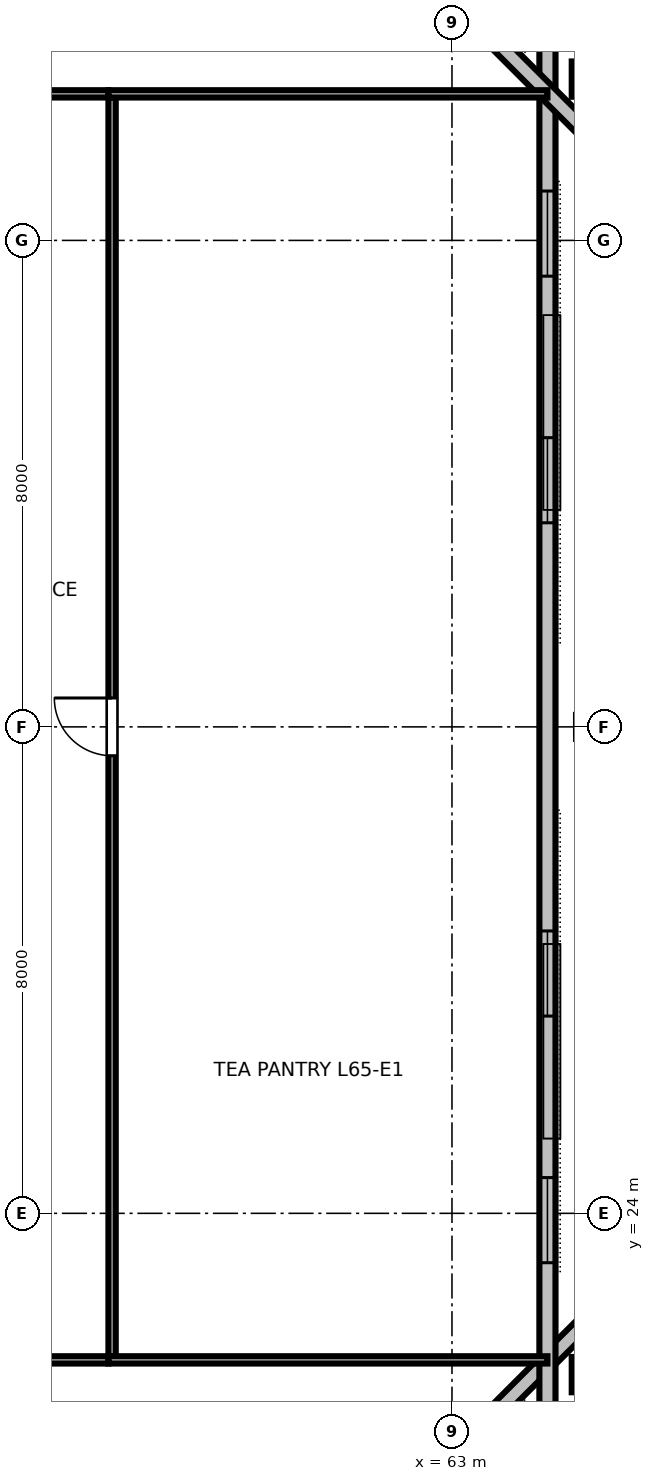
"""IFC4 building model, lengths in metres.
Left out: names, types, materials, properties, quantities, classifications, styles, units other than length and angle.
Written with IfcOpenShell. Run it as: python <this file> out.ifc"""

import sys

from ifc_helpers import new_model, si_unit, direction, frame, frame_2d, origin, origin_2d, place, context, subcontext, project, spatial, rectangle, hollow_rectangle, i_section, extrude, element, fill, save


model = new_model("IFC4")
c1 = context("Model", 3, precision=1e-05, world=origin(), true_north=direction((0.0, 1.0)))
c2 = subcontext(c1, "Body", "Model", "MODEL_VIEW")
j1 = project(units=[si_unit("LENGTHUNIT", "METRE"), si_unit("PLANEANGLEUNIT", "RADIAN")], contexts=[c1])
p1 = place(None, origin())
s1 = spatial("IfcSite", under=j1, at=p1, CompositionType="ELEMENT")
p2 = place(p1, origin())
s2 = spatial("IfcBuilding", under=s1, at=p2, CompositionType="ELEMENT")
p3 = place(p2, frame((0.0, 0.0, 246.6)))
s3 = spatial("IfcBuildingStorey", under=s2, at=p3, CompositionType="ELEMENT", Elevation=246.6)
p4 = place(p3, frame((65.32, 21.348, 0.0), z_axis=(-0.177670579794, 0.155655183327, 0.971701923935), x_axis=(0.730885754555, -0.640320734295, 0.236210438002)))
e1 = element("IfcColumn", 1, at=p4, inside=s3, PredefinedType="COLUMN", context=c2, shape_type="SweptSolid", body=[
    extrude(hollow_rectangle(XDim=0.58, YDim=0.7, WallThickness=0.032, at=origin_2d()), origin(), (0.0, 0.0, 1.0), 3.471),
])
p5 = place(p3, frame((65.23, 32.0, 0.0), z_axis=(-0.178966909192, 0.0, 0.983855093708), x_axis=(0.983855093708, 0.0, 0.178966909192)))
e2 = element("IfcColumn", 2, at=p5, inside=s3, PredefinedType="COLUMN", context=c2, shape_type="SweptSolid", body=[
    extrude(i_section(OverallWidth=0.395, OverallDepth=0.38, WebThickness=0.019, FlangeThickness=0.03, FilletRadius=0.025, at=origin_2d()), origin(), (0.0, 0.0, 1.0), 3.428),
])
p6 = place(p3, frame((65.32, 42.652, 0.0), z_axis=(-0.177670579794, -0.155655183327, 0.971701923935), x_axis=(0.730885754555, 0.640320734295, 0.236210438002)))
e3 = element("IfcColumn", 3, at=p6, inside=s3, PredefinedType="COLUMN", context=c2, shape_type="SweptSolid", body=[
    extrude(hollow_rectangle(XDim=0.58, YDim=0.7, WallThickness=0.032, at=origin_2d()), origin(), (0.0, 0.0, 1.0), 3.471),
])
p7 = place(p3, frame((57.604, 14.606, 0.0), z_axis=(0.0, 0.0, 1.0), x_axis=(0.707106781187, 0.707106781187, 0.0)))
e4 = element("IfcWall", 4, at=p7, inside=s3, PredefinedType="STANDARD", context=c2, shape_type="SweptSolid", body=[
    extrude(rectangle(XDim=10.662, YDim=0.265, at=frame_2d((5.331, 0.0))), origin(), (0.0, 0.0, 1.0), 2.832),
])
p8 = place(p3, frame((64.57, 20.76, 0.0), z_axis=(0.0, 0.0, 1.0), x_axis=(0.0, 1.0, 0.0)))
e5 = element("IfcWall", 5, at=p8, inside=s3, PredefinedType="STANDARD", context=c2, shape_type="SweptSolid", body=[
    extrude(rectangle(XDim=22.48, YDim=0.265, at=frame_2d((11.24, 0.0))), origin(), (0.0, 0.0, 1.0), 2.832),
])
p9 = place(p8, frame((2.428, 0.0, 0.85)))
e6 = element("IfcOpeningElement", 6, at=p9, cuts=e5, PredefinedType="OPENING", context=c2, shape_type="SweptSolid", body=[
    extrude(rectangle(XDim=1.4, YDim=1.2, at=frame_2d((0.7, 0.6))), frame((0.0, 0.142, 0.0), z_axis=(0.0, -1.0, 0.0), x_axis=(1.0, 0.0, 0.0)), (0.0, 0.0, 1.0), 0.285),
])
p10 = place(p8, frame((6.484, 0.0, 0.85)))
e7 = element("IfcOpeningElement", 7, at=p10, cuts=e5, PredefinedType="OPENING", context=c2, shape_type="SweptSolid", body=[
    extrude(rectangle(XDim=1.4, YDim=1.2, at=frame_2d((0.7, 0.6))), frame((0.0, 0.142, 0.0), z_axis=(0.0, -1.0, 0.0), x_axis=(1.0, 0.0, 0.0)), (0.0, 0.0, 1.0), 0.285),
])
p11 = place(p8, frame((14.596, 0.0, 0.85)))
e8 = element("IfcOpeningElement", 8, at=p11, cuts=e5, PredefinedType="OPENING", context=c2, shape_type="SweptSolid", body=[
    extrude(rectangle(XDim=1.4, YDim=1.2, at=frame_2d((0.7, 0.6))), frame((0.0, 0.142, 0.0), z_axis=(0.0, -1.0, 0.0), x_axis=(1.0, 0.0, 0.0)), (0.0, 0.0, 1.0), 0.285),
])
p12 = place(p8, frame((18.652, 0.0, 0.85)))
e9 = element("IfcOpeningElement", 9, at=p12, cuts=e5, PredefinedType="OPENING", context=c2, shape_type="SweptSolid", body=[
    extrude(rectangle(XDim=1.4, YDim=1.2, at=frame_2d((0.7, 0.6))), frame((0.0, 0.142, 0.0), z_axis=(0.0, -1.0, 0.0), x_axis=(1.0, 0.0, 0.0)), (0.0, 0.0, 1.0), 0.285),
])
p13 = place(p3, frame((65.144, 41.854, 0.0), z_axis=(0.0, 0.0, 1.0), x_axis=(-0.707106781187, 0.707106781187, 0.0)))
e10 = element("IfcWall", 10, at=p13, inside=s3, PredefinedType="STANDARD", context=c2, shape_type="SweptSolid", body=[
    extrude(rectangle(XDim=10.662, YDim=0.265, at=frame_2d((5.331, 0.0))), origin(), (0.0, 0.0, 1.0), 2.832),
])
p14 = place(p3, frame((47.02, 21.59, 0.0), z_axis=(0.0, 0.0, 1.0), x_axis=(1.0, 0.0, 0.0)))
e11 = element("IfcWall", 11, at=p14, inside=s3, PredefinedType="PARTITIONING", context=c2, shape_type="SweptSolid", body=[
    extrude(rectangle(XDim=10.33, YDim=0.12, at=frame_2d((5.165, 0.0))), origin(), (0.0, 0.0, 1.0), 2.655),
])
p15 = place(p14, frame((4.62, 0.0, 0.0)))
e12 = element("IfcOpeningElement", 12, at=p15, cuts=e11, PredefinedType="OPENING", context=c2, shape_type="SweptSolid", body=[
    extrude(rectangle(XDim=0.95, YDim=2.15, at=frame_2d((0.475, 1.075))), frame((0.0, 0.07, 0.0), z_axis=(0.0, -1.0, 0.0), x_axis=(1.0, 0.0, 0.0)), (0.0, 0.0, 1.0), 0.14),
])
p16 = place(p3, frame((47.02, 42.41, 0.0), z_axis=(0.0, 0.0, 1.0), x_axis=(1.0, 0.0, 0.0)))
e13 = element("IfcWall", 13, at=p16, inside=s3, PredefinedType="PARTITIONING", context=c2, shape_type="SweptSolid", body=[
    extrude(rectangle(XDim=10.33, YDim=0.12, at=frame_2d((5.165, 0.0))), origin(), (0.0, 0.0, 1.0), 2.655),
])
p17 = place(p16, frame((0.81, 0.0, 0.0)))
e14 = element("IfcOpeningElement", 14, at=p17, cuts=e13, PredefinedType="OPENING", context=c2, shape_type="SweptSolid", body=[
    extrude(rectangle(XDim=0.95, YDim=2.15, at=frame_2d((0.475, 1.075))), frame((0.0, 0.07, 0.0), z_axis=(0.0, -1.0, 0.0), x_axis=(1.0, 0.0, 0.0)), (0.0, 0.0, 1.0), 0.14),
])
p18 = place(p16, frame((5.905, 0.0, 0.0)))
e15 = element("IfcOpeningElement", 15, at=p18, cuts=e13, PredefinedType="OPENING", context=c2, shape_type="SweptSolid", body=[
    extrude(rectangle(XDim=0.95, YDim=2.15, at=frame_2d((0.475, 1.075))), frame((0.0, 0.07, 0.0), z_axis=(0.0, -1.0, 0.0), x_axis=(1.0, 0.0, 0.0)), (0.0, 0.0, 1.0), 0.14),
])
p19 = place(p3, frame((57.41, 21.65, 0.0), z_axis=(0.0, 0.0, 1.0), x_axis=(0.0, 1.0, 0.0)))
e16 = element("IfcWall", 16, at=p19, inside=s3, PredefinedType="PARTITIONING", context=c2, shape_type="SweptSolid", body=[
    extrude(rectangle(XDim=20.7, YDim=0.12, at=frame_2d((10.35, 0.0))), origin(), (0.0, 0.0, 1.0), 2.655),
])
p20 = place(p19, frame((9.875, 0.0, 0.0)))
e17 = element("IfcOpeningElement", 17, at=p20, cuts=e16, PredefinedType="OPENING", context=c2, shape_type="SweptSolid", body=[
    extrude(rectangle(XDim=0.95, YDim=2.15, at=frame_2d((0.475, 1.075))), frame((0.0, 0.07, 0.0), z_axis=(0.0, -1.0, 0.0), x_axis=(1.0, 0.0, 0.0)), (0.0, 0.0, 1.0), 0.14),
])
for number, where, z_axis, x_axis in (
    (18, (57.35, 21.59, 0.0), (0.0, 0.0, 1.0), (1.0, 0.0, 0.0)),
    (19, (57.35, 42.41, 0.0), (0.0, 0.0, 1.0), (1.0, 0.0, 0.0)),
):
    element("IfcWall", number, at=place(p3, frame(where, z_axis=z_axis, x_axis=x_axis)), inside=s3, PredefinedType="PARTITIONING", context=c2, shape_type="SweptSolid", body=[
        extrude(rectangle(XDim=7.22, YDim=0.12, at=frame_2d((3.61, 0.0))), origin(), (0.0, 0.0, 1.0), 2.655),
    ])
p21 = place(p9, origin())
e20 = element("IfcWindow", 20, at=p21, inside=s3, PartitioningType="SINGLE_PANEL", PredefinedType="WINDOW", context=c2, shape_type="SweptSolid", body=[
    extrude(rectangle(XDim=1.4, YDim=1.2, at=frame_2d((0.7, 0.6))), frame((0.0, 0.03, 0.0), z_axis=(0.0, -1.0, 0.0), x_axis=(1.0, 0.0, 0.0)), (0.0, 0.0, 1.0), 0.06),
])
fill(e6, e20)
p22 = place(p10, origin())
e21 = element("IfcWindow", 21, at=p22, inside=s3, PartitioningType="SINGLE_PANEL", PredefinedType="WINDOW", context=c2, shape_type="SweptSolid", body=[
    extrude(rectangle(XDim=1.4, YDim=1.2, at=frame_2d((0.7, 0.6))), frame((0.0, 0.03, 0.0), z_axis=(0.0, -1.0, 0.0), x_axis=(1.0, 0.0, 0.0)), (0.0, 0.0, 1.0), 0.06),
])
fill(e7, e21)
p23 = place(p11, origin())
e22 = element("IfcWindow", 22, at=p23, inside=s3, PartitioningType="SINGLE_PANEL", PredefinedType="WINDOW", context=c2, shape_type="SweptSolid", body=[
    extrude(rectangle(XDim=1.4, YDim=1.2, at=frame_2d((0.7, 0.6))), frame((0.0, 0.03, 0.0), z_axis=(0.0, -1.0, 0.0), x_axis=(1.0, 0.0, 0.0)), (0.0, 0.0, 1.0), 0.06),
])
fill(e8, e22)
p24 = place(p12, origin())
e23 = element("IfcWindow", 23, at=p24, inside=s3, PartitioningType="SINGLE_PANEL", PredefinedType="WINDOW", context=c2, shape_type="SweptSolid", body=[
    extrude(rectangle(XDim=1.4, YDim=1.2, at=frame_2d((0.7, 0.6))), frame((0.0, 0.03, 0.0), z_axis=(0.0, -1.0, 0.0), x_axis=(1.0, 0.0, 0.0)), (0.0, 0.0, 1.0), 0.06),
])
fill(e9, e23)
p25 = place(p20, origin())
e24 = element("IfcDoor", 24, at=p25, inside=s3, OperationType="SINGLE_SWING_RIGHT", PredefinedType="DOOR", context=c2, shape_type="SweptSolid", body=[
    extrude(rectangle(XDim=0.95, YDim=2.15, at=frame_2d((0.475, 1.075))), frame((0.0, 0.025, 0.0), z_axis=(0.0, -1.0, 0.0), x_axis=(1.0, 0.0, 0.0)), (0.0, 0.0, 1.0), 0.05),
])
fill(e17, e24)
save(model, sys.argv[1])
